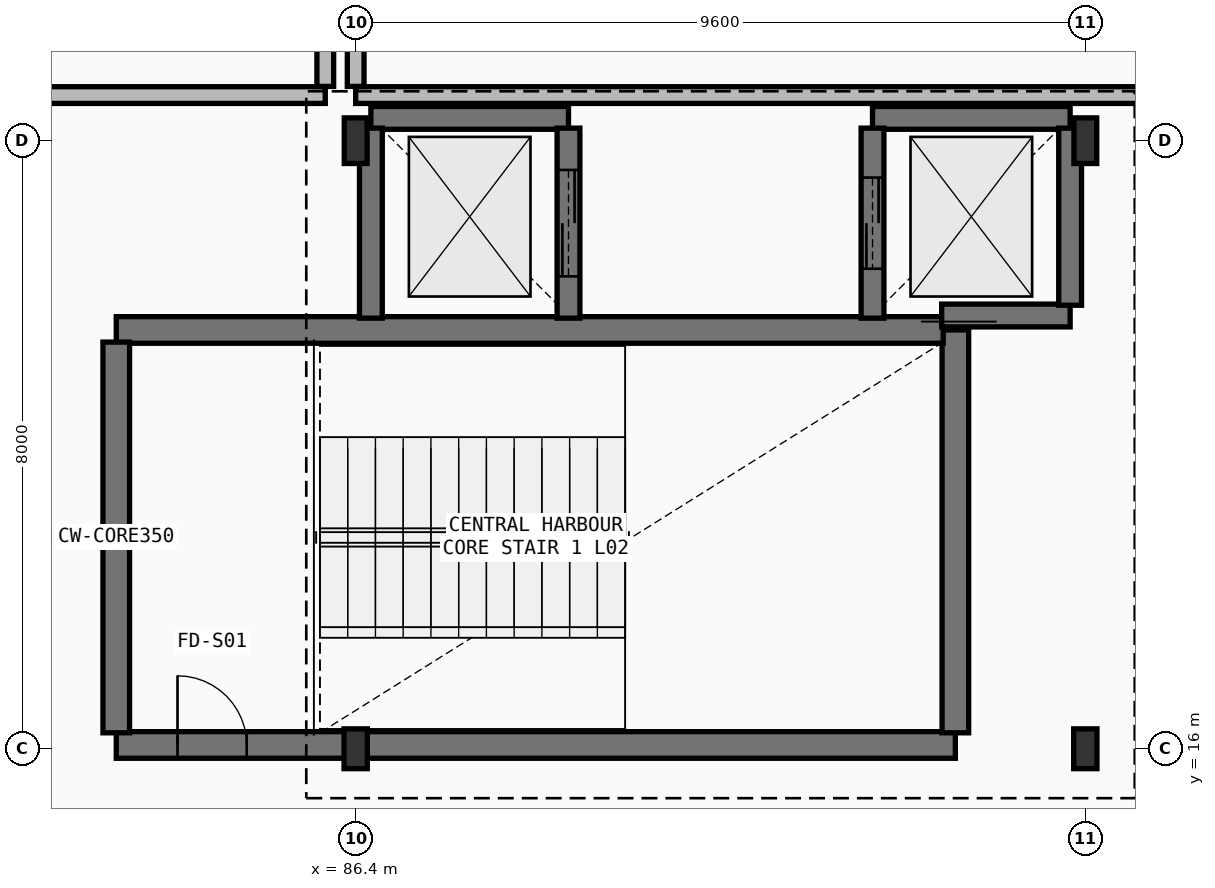
"""IFC4 building model, lengths in metres.
Left out: names, types, materials, properties, quantities, classifications, styles, units other than length and angle.
Written with IfcOpenShell. Run it as: python <this file> out.ifc"""

import sys

from ifc_helpers import new_model, si_unit, direction, frame, frame_2d, origin, origin_2d, place, context, subcontext, project, spatial, rectangle, i_section, extrude, element, fill, save


model = new_model("IFC4")
c1 = context("Model", 3, precision=1e-05, world=origin(), true_north=direction((0.0, 1.0)))
c2 = subcontext(c1, "Body", "Model", "MODEL_VIEW")
j1 = project(units=[si_unit("LENGTHUNIT", "METRE"), si_unit("PLANEANGLEUNIT", "RADIAN")], contexts=[c1])
p1 = place(None, origin())
s1 = spatial("IfcSite", under=j1, at=p1, CompositionType="ELEMENT")
p2 = place(p1, origin())
s2 = spatial("IfcBuilding", under=s1, at=p2, CompositionType="ELEMENT")
p3 = place(p2, frame((0.0, 0.0, 11.4)))
s3 = spatial("IfcBuildingStorey", under=s2, at=p3, CompositionType="ELEMENT", Elevation=11.4)
p4 = place(p3, frame((86.4, 16.0, 0.0), z_axis=(0.0, 0.0, 1.0), x_axis=(1.0, 0.0, 0.0)))
e1 = element("IfcColumn", 1, at=p4, inside=s3, PredefinedType="COLUMN", context=c2, shape_type="SweptSolid", body=[
    extrude(i_section(OverallWidth=0.306, OverallDepth=0.524, WebThickness=0.021, FlangeThickness=0.04, FilletRadius=0.027, at=origin_2d()), origin(), (0.0, 0.0, 1.0), 4.5),
])
p5 = place(p3, frame((86.4, 24.0, 0.0), z_axis=(0.0, 0.0, 1.0), x_axis=(1.0, 0.0, 0.0)))
e2 = element("IfcColumn", 2, at=p5, inside=s3, PredefinedType="COLUMN", context=c2, shape_type="SweptSolid", body=[
    extrude(i_section(OverallWidth=0.3, OverallDepth=0.6, WebThickness=0.015, FlangeThickness=0.03, FilletRadius=0.027, at=origin_2d()), origin(), (0.0, 0.0, 1.0), 4.5),
])
p6 = place(p3, frame((96.0, 16.0, 0.0), z_axis=(0.0, 0.0, 1.0), x_axis=(1.0, 0.0, 0.0)))
e3 = element("IfcColumn", 3, at=p6, inside=s3, PredefinedType="COLUMN", context=c2, shape_type="SweptSolid", body=[
    extrude(i_section(OverallWidth=0.306, OverallDepth=0.524, WebThickness=0.021, FlangeThickness=0.04, FilletRadius=0.027, at=origin_2d()), origin(), (0.0, 0.0, 1.0), 4.5),
])
p7 = place(p3, frame((96.0, 24.0, 0.0), z_axis=(0.0, 0.0, 1.0), x_axis=(1.0, 0.0, 0.0)))
e4 = element("IfcColumn", 4, at=p7, inside=s3, PredefinedType="COLUMN", context=c2, shape_type="SweptSolid", body=[
    extrude(i_section(OverallWidth=0.3, OverallDepth=0.6, WebThickness=0.015, FlangeThickness=0.03, FilletRadius=0.027, at=origin_2d()), origin(), (0.0, 0.0, 1.0), 4.5),
])
p8 = place(p3, frame((83.25, 16.05, 0.0), z_axis=(0.0, 0.0, 1.0), x_axis=(1.0, 0.0, 0.0)))
e5 = element("IfcWall", 5, at=p8, inside=s3, PredefinedType="SHEAR", context=c2, shape_type="SweptSolid", body=[
    extrude(rectangle(XDim=11.04, YDim=0.35, at=frame_2d((5.52, 0.0))), origin(), (0.0, 0.0, 1.0), 4.27),
])
p9 = place(p8, frame((0.806, 0.0, 0.0)))
e6 = element("IfcOpeningElement", 6, at=p9, cuts=e5, PredefinedType="OPENING", context=c2, shape_type="SweptSolid", body=[
    extrude(rectangle(XDim=0.91, YDim=2.08, at=frame_2d((0.455, 1.04))), frame((0.0, 0.185, 0.0), z_axis=(0.0, -1.0, 0.0), x_axis=(1.0, 0.0, 0.0)), (0.0, 0.0, 1.0), 0.37),
])
p10 = place(p3, frame((94.29, 16.21, 0.0), z_axis=(0.0, 0.0, 1.0), x_axis=(0.0, 1.0, 0.0)))
e7 = element("IfcWall", 7, at=p10, inside=s3, PredefinedType="SHEAR", context=c2, shape_type="SweptSolid", body=[
    extrude(rectangle(XDim=5.3, YDim=0.35, at=frame_2d((2.65, 0.0))), origin(), (0.0, 0.0, 1.0), 4.27),
])
p11 = place(p3, frame((94.13, 21.51, 0.0), z_axis=(0.0, 0.0, 1.0), x_axis=(-1.0, 0.0, 0.0)))
e8 = element("IfcWall", 8, at=p11, inside=s3, PredefinedType="SHEAR", context=c2, shape_type="SweptSolid", body=[
    extrude(rectangle(XDim=10.88, YDim=0.35, at=frame_2d((5.44, 0.0))), origin(), (0.0, 0.0, 1.0), 4.27),
])
p12 = place(p3, frame((83.25, 21.35, 0.0), z_axis=(0.0, 0.0, 1.0), x_axis=(0.0, -1.0, 0.0)))
e9 = element("IfcWall", 9, at=p12, inside=s3, PredefinedType="SHEAR", context=c2, shape_type="SweptSolid", body=[
    extrude(rectangle(XDim=5.14, YDim=0.35, at=frame_2d((2.57, 0.0))), origin(), (0.0, 0.0, 1.0), 4.27),
])
p13 = place(p3, frame((89.2, 24.3, 0.0), z_axis=(0.0, 0.0, 1.0), x_axis=(-1.0, 0.0, 0.0)))
e10 = element("IfcWall", 10, at=p13, inside=s3, PredefinedType="SHEAR", context=c2, shape_type="SweptSolid", body=[
    extrude(rectangle(XDim=2.6, YDim=0.3, at=frame_2d((1.3, 0.0))), origin(), (0.0, 0.0, 1.0), 4.27),
])
p14 = place(p3, frame((89.2, 21.665, 0.0), z_axis=(0.0, 0.0, 1.0), x_axis=(0.0, 1.0, 0.0)))
e11 = element("IfcWall", 11, at=p14, inside=s3, PredefinedType="SHEAR", context=c2, shape_type="SweptSolid", body=[
    extrude(rectangle(XDim=2.5, YDim=0.3, at=frame_2d((1.25, 0.0))), origin(), (0.0, 0.0, 1.0), 4.27),
])
p15 = place(p14, frame((0.55, 0.0, 0.0)))
e12 = element("IfcOpeningElement", 12, at=p15, cuts=e11, PredefinedType="OPENING", context=c2, shape_type="SweptSolid", body=[
    extrude(rectangle(XDim=1.4, YDim=2.26, at=frame_2d((0.7, 1.13))), frame((0.0, 0.16, 0.0), z_axis=(0.0, -1.0, 0.0), x_axis=(1.0, 0.0, 0.0)), (0.0, 0.0, 1.0), 0.32),
])
p16 = place(p3, frame((86.6, 24.165, 0.0), z_axis=(0.0, 0.0, 1.0), x_axis=(0.0, -1.0, 0.0)))
e13 = element("IfcWall", 13, at=p16, inside=s3, PredefinedType="SHEAR", context=c2, shape_type="SweptSolid", body=[
    extrude(rectangle(XDim=2.5, YDim=0.3, at=frame_2d((1.25, 0.0))), origin(), (0.0, 0.0, 1.0), 4.27),
])
p17 = place(p3, frame((95.8, 24.3, 0.0), z_axis=(0.0, 0.0, 1.0), x_axis=(-1.0, 0.0, 0.0)))
e14 = element("IfcWall", 14, at=p17, inside=s3, PredefinedType="SHEAR", context=c2, shape_type="SweptSolid", body=[
    extrude(rectangle(XDim=2.6, YDim=0.3, at=frame_2d((1.3, 0.0))), origin(), (0.0, 0.0, 1.0), 4.27),
])
p18 = place(p3, frame((94.11, 21.7, 0.0), z_axis=(0.0, 0.0, 1.0), x_axis=(1.0, 0.0, 0.0)))
e15 = element("IfcWall", 15, at=p18, inside=s3, PredefinedType="SHEAR", context=c2, shape_type="SweptSolid", body=[
    extrude(rectangle(XDim=1.69, YDim=0.3, at=frame_2d((0.845, 0.0))), origin(), (0.0, 0.0, 1.0), 4.27),
])
p19 = place(p3, frame((95.8, 21.835, 0.0), z_axis=(0.0, 0.0, 1.0), x_axis=(0.0, 1.0, 0.0)))
e16 = element("IfcWall", 16, at=p19, inside=s3, PredefinedType="SHEAR", context=c2, shape_type="SweptSolid", body=[
    extrude(rectangle(XDim=2.33, YDim=0.3, at=frame_2d((1.165, 0.0))), origin(), (0.0, 0.0, 1.0), 4.27),
])
p20 = place(p3, frame((93.2, 24.165, 0.0), z_axis=(0.0, 0.0, 1.0), x_axis=(0.0, -1.0, 0.0)))
e17 = element("IfcWall", 17, at=p20, inside=s3, PredefinedType="SHEAR", context=c2, shape_type="SweptSolid", body=[
    extrude(rectangle(XDim=2.5, YDim=0.3, at=frame_2d((1.25, 0.0))), origin(), (0.0, 0.0, 1.0), 4.27),
])
p21 = place(p20, frame((0.65, 0.0, 0.0)))
e18 = element("IfcOpeningElement", 18, at=p21, cuts=e17, PredefinedType="OPENING", context=c2, shape_type="SweptSolid", body=[
    extrude(rectangle(XDim=1.2, YDim=2.2, at=frame_2d((0.6, 1.1))), frame((0.0, 0.16, 0.0), z_axis=(0.0, -1.0, 0.0), x_axis=(1.0, 0.0, 0.0)), (0.0, 0.0, 1.0), 0.32),
])
p22 = place(p3, frame((67.6, 24.6, 0.0), z_axis=(0.0, 0.0, 1.0), x_axis=(1.0, 0.0, 0.0)))
e19 = element("IfcWall", 19, at=p22, inside=s3, PredefinedType="PARTITIONING", context=c2, shape_type="SweptSolid", body=[
    extrude(rectangle(XDim=18.4, YDim=0.22, at=frame_2d((9.2, 0.0))), origin(), (0.0, 0.0, 1.0), 3.74),
])
p23 = place(p22, frame((5.894, 0.0, 0.0)))
e20 = element("IfcOpeningElement", 20, at=p23, cuts=e19, PredefinedType="OPENING", context=c2, shape_type="SweptSolid", body=[
    extrude(rectangle(XDim=1.56, YDim=2.18, at=frame_2d((0.78, 1.09))), frame((0.0, 0.12, 0.0), z_axis=(0.0, -1.0, 0.0), x_axis=(1.0, 0.0, 0.0)), (0.0, 0.0, 1.0), 0.24),
])
p24 = place(p3, frame((86.0, 24.714, 0.0), z_axis=(0.0, 0.0, 1.0), x_axis=(0.0, 1.0, 0.0)))
e21 = element("IfcWall", 21, at=p24, inside=s3, PredefinedType="PARTITIONING", context=c2, shape_type="SweptSolid", body=[
    extrude(rectangle(XDim=14.686, YDim=0.22, at=frame_2d((7.343, 0.0))), origin(), (0.0, 0.0, 1.0), 3.74),
])
p25 = place(p3, frame((86.4, 24.6, 0.0), z_axis=(0.0, 0.0, 1.0), x_axis=(1.0, 0.0, 0.0)))
e22 = element("IfcWall", 22, at=p25, inside=s3, PredefinedType="PARTITIONING", context=c2, shape_type="SweptSolid", body=[
    extrude(rectangle(XDim=19.2, YDim=0.22, at=frame_2d((9.6, 0.0))), origin(), (0.0, 0.0, 1.0), 3.34),
])
p26 = place(p25, frame((11.414, 0.0, 0.0)))
e23 = element("IfcOpeningElement", 23, at=p26, cuts=e22, PredefinedType="OPENING", context=c2, shape_type="SweptSolid", body=[
    extrude(rectangle(XDim=1.64, YDim=2.2, at=frame_2d((0.82, 1.1))), frame((0.0, 0.12, 0.0), z_axis=(0.0, -1.0, 0.0), x_axis=(1.0, 0.0, 0.0)), (0.0, 0.0, 1.0), 0.24),
])
p27 = place(p25, frame((14.157, 0.0, 0.0)))
e24 = element("IfcOpeningElement", 24, at=p27, cuts=e22, PredefinedType="OPENING", context=c2, shape_type="SweptSolid", body=[
    extrude(rectangle(XDim=1.05, YDim=2.35, at=frame_2d((0.525, 1.175))), frame((0.0, 0.12, 0.0), z_axis=(0.0, -1.0, 0.0), x_axis=(1.0, 0.0, 0.0)), (0.0, 0.0, 1.0), 0.24),
])
p28 = place(p3, frame((86.4, 39.286, 0.0), z_axis=(0.0, 0.0, 1.0), x_axis=(0.0, -1.0, 0.0)))
e25 = element("IfcWall", 25, at=p28, inside=s3, PredefinedType="PARTITIONING", context=c2, shape_type="SweptSolid", body=[
    extrude(rectangle(XDim=14.572, YDim=0.22, at=frame_2d((7.286, 0.0))), origin(), (0.0, 0.0, 1.0), 3.64),
])
p29 = place(p9, origin())
e26 = element("IfcDoor", 26, at=p29, inside=s3, OperationType="SINGLE_SWING_RIGHT", PredefinedType="DOOR", context=c2, shape_type="SweptSolid", body=[
    extrude(rectangle(XDim=0.91, YDim=2.08, at=frame_2d((0.455, 1.04))), frame((0.0, 0.025, 0.0), z_axis=(0.0, -1.0, 0.0), x_axis=(1.0, 0.0, 0.0)), (0.0, 0.0, 1.0), 0.05),
])
fill(e6, e26)
p30 = place(p15, origin())
e27 = element("IfcDoor", 27, at=p30, inside=s3, OperationType="DOUBLE_DOOR_SLIDING", PredefinedType="DOOR", context=c2, shape_type="SweptSolid", body=[
    extrude(rectangle(XDim=1.4, YDim=2.26, at=frame_2d((0.7, 1.13))), frame((0.0, 0.025, 0.0), z_axis=(0.0, -1.0, 0.0), x_axis=(1.0, 0.0, 0.0)), (0.0, 0.0, 1.0), 0.05),
])
fill(e12, e27)
p31 = place(p21, origin())
e28 = element("IfcDoor", 28, at=p31, inside=s3, OperationType="DOUBLE_DOOR_SLIDING", PredefinedType="DOOR", context=c2, shape_type="SweptSolid", body=[
    extrude(rectangle(XDim=1.2, YDim=2.2, at=frame_2d((0.6, 1.1))), frame((0.0, 0.025, 0.0), z_axis=(0.0, -1.0, 0.0), x_axis=(1.0, 0.0, 0.0)), (0.0, 0.0, 1.0), 0.05),
])
fill(e18, e28)
save(model, sys.argv[1])
